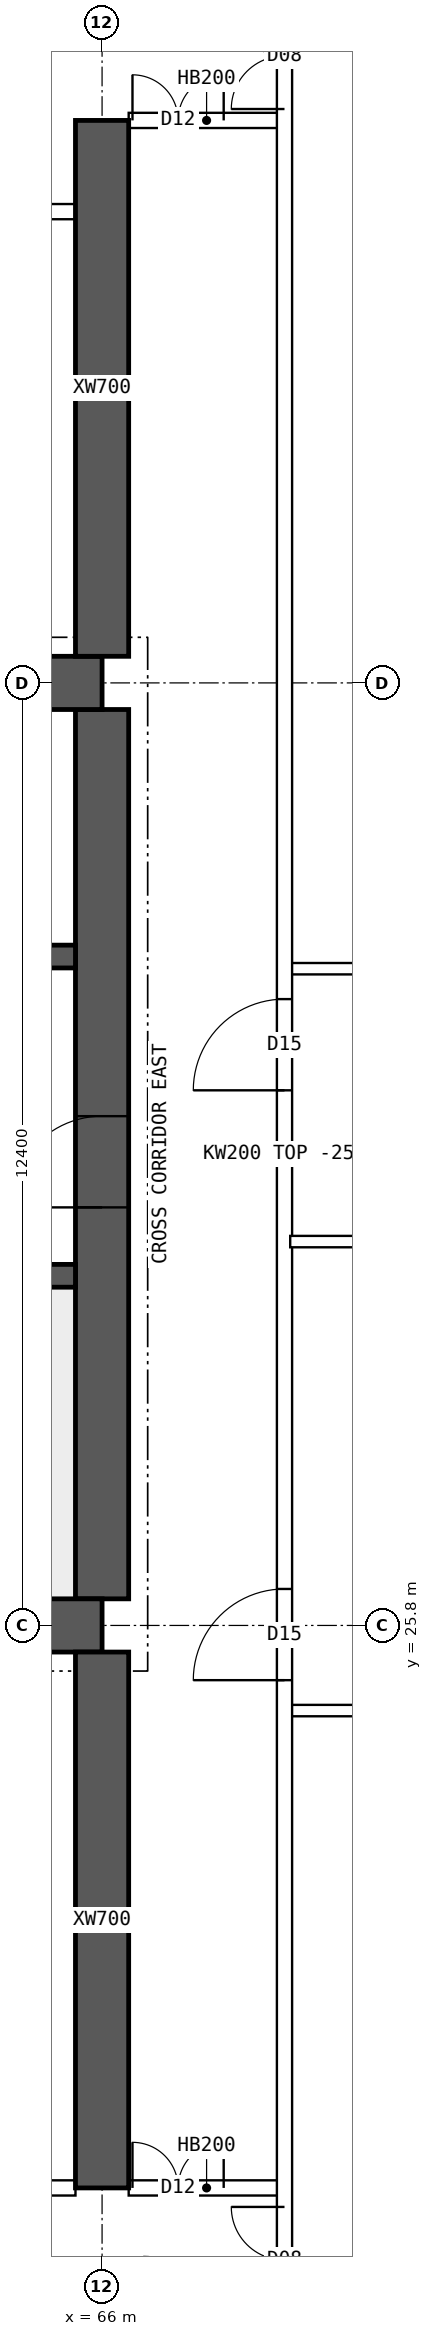
"""IFC4 building model, lengths in metres.
Left out: names, types, materials, properties, quantities, classifications, styles, units other than length and angle.
Written with IfcOpenShell. Run it as: python <this file> out.ifc"""

import sys

from ifc_helpers import new_model, si_unit, direction, frame, frame_2d, origin, place, context, subcontext, project, spatial, polyline, rectangle, outline, extrude, element, fill, save


model = new_model("IFC4")
c1 = context("Model", 3, precision=1e-05, world=origin(), true_north=direction((0.0, 1.0)))
c2 = subcontext(c1, "Body", "Model", "MODEL_VIEW")
j1 = project(units=[si_unit("LENGTHUNIT", "METRE"), si_unit("PLANEANGLEUNIT", "RADIAN")], contexts=[c1])
p1 = place(None, origin())
s1 = spatial("IfcSite", under=j1, at=p1, CompositionType="ELEMENT")
p2 = place(p1, origin())
s2 = spatial("IfcBuilding", under=s1, at=p2, CompositionType="ELEMENT")
p3 = place(p2, frame((0.0, 0.0, 224.05)))
s3 = spatial("IfcBuildingStorey", under=s2, at=p3, CompositionType="ELEMENT", Elevation=224.05)
for number, where, z_axis, x_axis in (
    (1, (18.0, 25.8, 0.0), (0.0, 0.0, 1.0), (1.0, 0.0, 0.0)),
    (2, (18.0, 38.2, 0.0), (0.0, 0.0, 1.0), (1.0, 0.0, 0.0)),
):
    element("IfcWall", number, at=place(p3, frame(where, z_axis=z_axis, x_axis=x_axis)), inside=s3, PredefinedType="SHEAR", context=c2, shape_type="SweptSolid", body=[
        extrude(rectangle(XDim=48.0, YDim=0.7, at=frame_2d((24.0, 0.0))), origin(), (0.0, 0.0, 1.0), 3.75),
    ])
p4 = place(p3, frame((66.0, 26.15, 0.0), z_axis=(0.0, 0.0, 1.0), x_axis=(0.0, 1.0, 0.0)))
e3 = element("IfcWall", 3, at=p4, inside=s3, PredefinedType="SHEAR", context=c2, shape_type="SweptSolid", body=[
    extrude(rectangle(XDim=11.7, YDim=0.7, at=frame_2d((5.85, 0.0))), origin(), (0.0, 0.0, 1.0), 3.75),
])
p5 = place(p4, frame((5.15, 0.0, 0.0)))
e4 = element("IfcOpeningElement", 4, at=p5, cuts=e3, PredefinedType="OPENING", context=c2, shape_type="SweptSolid", body=[
    extrude(rectangle(XDim=1.2, YDim=2.1, at=frame_2d((0.6, 1.05))), frame((0.0, 0.36, 0.0), z_axis=(0.0, -1.0, 0.0), x_axis=(1.0, 0.0, 0.0)), (0.0, 0.0, 1.0), 0.72),
])
p6 = place(p3, frame((18.35, 30.4, 0.0), z_axis=(0.0, 0.0, 1.0), x_axis=(1.0, 0.0, 0.0)))
e5 = element("IfcWall", 5, at=p6, inside=s3, PredefinedType="SHEAR", context=c2, shape_type="SweptSolid", body=[
    extrude(rectangle(XDim=47.3, YDim=0.3, at=frame_2d((23.65, 0.0))), origin(), (0.0, 0.0, 1.0), 3.75),
])
p7 = place(p6, frame((0.4, 0.0, 0.0)))
e6 = element("IfcOpeningElement", 6, at=p7, cuts=e5, PredefinedType="OPENING", context=c2, shape_type="SweptSolid", body=[
    extrude(rectangle(XDim=1.0, YDim=2.1, at=frame_2d((0.5, 1.05))), frame((0.0, 0.16, 0.0), z_axis=(0.0, -1.0, 0.0), x_axis=(1.0, 0.0, 0.0)), (0.0, 0.0, 1.0), 0.32),
])
p8 = place(p6, frame((45.9, 0.0, 0.0)))
e7 = element("IfcOpeningElement", 7, at=p8, cuts=e5, PredefinedType="OPENING", context=c2, shape_type="SweptSolid", body=[
    extrude(rectangle(XDim=1.0, YDim=2.1, at=frame_2d((0.5, 1.05))), frame((0.0, 0.16, 0.0), z_axis=(0.0, -1.0, 0.0), x_axis=(1.0, 0.0, 0.0)), (0.0, 0.0, 1.0), 0.32),
])
p9 = place(p6, frame((8.4, 0.0, 0.0)))
e8 = element("IfcOpeningElement", 8, at=p9, cuts=e5, PredefinedType="OPENING", context=c2, shape_type="SweptSolid", body=[
    extrude(rectangle(XDim=1.1, YDim=2.1, at=frame_2d((0.55, 1.05))), frame((0.0, 0.16, 0.0), z_axis=(0.0, -1.0, 0.0), x_axis=(1.0, 0.0, 0.0)), (0.0, 0.0, 1.0), 0.32),
])
p10 = place(p6, frame((11.0, 0.0, 0.0)))
e9 = element("IfcOpeningElement", 9, at=p10, cuts=e5, PredefinedType="OPENING", context=c2, shape_type="SweptSolid", body=[
    extrude(rectangle(XDim=1.1, YDim=2.1, at=frame_2d((0.55, 1.05))), frame((0.0, 0.16, 0.0), z_axis=(0.0, -1.0, 0.0), x_axis=(1.0, 0.0, 0.0)), (0.0, 0.0, 1.0), 0.32),
])
p11 = place(p6, frame((13.6, 0.0, 0.0)))
e10 = element("IfcOpeningElement", 10, at=p11, cuts=e5, PredefinedType="OPENING", context=c2, shape_type="SweptSolid", body=[
    extrude(rectangle(XDim=1.1, YDim=2.1, at=frame_2d((0.55, 1.05))), frame((0.0, 0.16, 0.0), z_axis=(0.0, -1.0, 0.0), x_axis=(1.0, 0.0, 0.0)), (0.0, 0.0, 1.0), 0.32),
])
p12 = place(p6, frame((16.2, 0.0, 0.0)))
e11 = element("IfcOpeningElement", 11, at=p12, cuts=e5, PredefinedType="OPENING", context=c2, shape_type="SweptSolid", body=[
    extrude(rectangle(XDim=1.1, YDim=2.1, at=frame_2d((0.55, 1.05))), frame((0.0, 0.16, 0.0), z_axis=(0.0, -1.0, 0.0), x_axis=(1.0, 0.0, 0.0)), (0.0, 0.0, 1.0), 0.32),
])
p13 = place(p6, frame((18.975, 0.0, 0.0)))
e12 = element("IfcOpeningElement", 12, at=p13, cuts=e5, PredefinedType="OPENING", context=c2, shape_type="SweptSolid", body=[
    extrude(rectangle(XDim=0.9, YDim=2.1, at=frame_2d((0.45, 1.05))), frame((0.0, 0.16, 0.0), z_axis=(0.0, -1.0, 0.0), x_axis=(1.0, 0.0, 0.0)), (0.0, 0.0, 1.0), 0.32),
])
p14 = place(p6, frame((24.475, 0.0, 0.0)))
e13 = element("IfcOpeningElement", 13, at=p14, cuts=e5, PredefinedType="OPENING", context=c2, shape_type="SweptSolid", body=[
    extrude(rectangle(XDim=0.9, YDim=2.1, at=frame_2d((0.45, 1.05))), frame((0.0, 0.16, 0.0), z_axis=(0.0, -1.0, 0.0), x_axis=(1.0, 0.0, 0.0)), (0.0, 0.0, 1.0), 0.32),
])
p15 = place(p6, frame((30.267, 0.0, 0.0)))
e14 = element("IfcOpeningElement", 14, at=p15, cuts=e5, PredefinedType="OPENING", context=c2, shape_type="SweptSolid", body=[
    extrude(rectangle(XDim=1.1, YDim=2.1, at=frame_2d((0.55, 1.05))), frame((0.0, 0.16, 0.0), z_axis=(0.0, -1.0, 0.0), x_axis=(1.0, 0.0, 0.0)), (0.0, 0.0, 1.0), 0.32),
])
p16 = place(p6, frame((33.8, 0.0, 0.0)))
e15 = element("IfcOpeningElement", 15, at=p16, cuts=e5, PredefinedType="OPENING", context=c2, shape_type="SweptSolid", body=[
    extrude(rectangle(XDim=1.1, YDim=2.1, at=frame_2d((0.55, 1.05))), frame((0.0, 0.16, 0.0), z_axis=(0.0, -1.0, 0.0), x_axis=(1.0, 0.0, 0.0)), (0.0, 0.0, 1.0), 0.32),
])
p17 = place(p6, frame((37.333, 0.0, 0.0)))
e16 = element("IfcOpeningElement", 16, at=p17, cuts=e5, PredefinedType="OPENING", context=c2, shape_type="SweptSolid", body=[
    extrude(rectangle(XDim=1.1, YDim=2.1, at=frame_2d((0.55, 1.05))), frame((0.0, 0.16, 0.0), z_axis=(0.0, -1.0, 0.0), x_axis=(1.0, 0.0, 0.0)), (0.0, 0.0, 1.0), 0.32),
])
p18 = place(p3, frame((18.35, 34.6, 0.0), z_axis=(0.0, 0.0, 1.0), x_axis=(1.0, 0.0, 0.0)))
e17 = element("IfcWall", 17, at=p18, inside=s3, PredefinedType="SHEAR", context=c2, shape_type="SweptSolid", body=[
    extrude(rectangle(XDim=47.3, YDim=0.3, at=frame_2d((23.65, 0.0))), origin(), (0.0, 0.0, 1.0), 3.75),
])
p19 = place(p18, frame((0.9, 0.0, 0.0)))
e18 = element("IfcOpeningElement", 18, at=p19, cuts=e17, PredefinedType="OPENING", context=c2, shape_type="SweptSolid", body=[
    extrude(rectangle(XDim=1.1, YDim=2.1, at=frame_2d((0.55, 1.05))), frame((0.0, 0.16, 0.0), z_axis=(0.0, -1.0, 0.0), x_axis=(1.0, 0.0, 0.0)), (0.0, 0.0, 1.0), 0.32),
])
p20 = place(p18, frame((45.3, 0.0, 0.0)))
e19 = element("IfcOpeningElement", 19, at=p20, cuts=e17, PredefinedType="OPENING", context=c2, shape_type="SweptSolid", body=[
    extrude(rectangle(XDim=1.1, YDim=2.1, at=frame_2d((0.55, 1.05))), frame((0.0, 0.16, 0.0), z_axis=(0.0, -1.0, 0.0), x_axis=(1.0, 0.0, 0.0)), (0.0, 0.0, 1.0), 0.32),
])
p21 = place(p18, frame((4.25, 0.0, 0.0)))
e20 = element("IfcOpeningElement", 20, at=p21, cuts=e17, PredefinedType="OPENING", context=c2, shape_type="SweptSolid", body=[
    extrude(rectangle(XDim=0.9, YDim=2.1, at=frame_2d((0.45, 1.05))), frame((0.0, 0.16, 0.0), z_axis=(0.0, -1.0, 0.0), x_axis=(1.0, 0.0, 0.0)), (0.0, 0.0, 1.0), 0.32),
])
p22 = place(p18, frame((42.15, 0.0, 0.0)))
e21 = element("IfcOpeningElement", 21, at=p22, cuts=e17, PredefinedType="OPENING", context=c2, shape_type="SweptSolid", body=[
    extrude(rectangle(XDim=0.9, YDim=2.1, at=frame_2d((0.45, 1.05))), frame((0.0, 0.16, 0.0), z_axis=(0.0, -1.0, 0.0), x_axis=(1.0, 0.0, 0.0)), (0.0, 0.0, 1.0), 0.32),
])
p23 = place(p18, frame((9.025, 0.0, 0.0)))
e22 = element("IfcOpeningElement", 22, at=p23, cuts=e17, PredefinedType="OPENING", context=c2, shape_type="SweptSolid", body=[
    extrude(rectangle(XDim=0.9, YDim=2.1, at=frame_2d((0.45, 1.05))), frame((0.0, 0.16, 0.0), z_axis=(0.0, -1.0, 0.0), x_axis=(1.0, 0.0, 0.0)), (0.0, 0.0, 1.0), 0.32),
])
p24 = place(p18, frame((12.999, 0.0, 0.0)))
e23 = element("IfcOpeningElement", 23, at=p24, cuts=e17, PredefinedType="OPENING", context=c2, shape_type="SweptSolid", body=[
    extrude(rectangle(XDim=0.9, YDim=2.1, at=frame_2d((0.45, 1.05))), frame((0.0, 0.16, 0.0), z_axis=(0.0, -1.0, 0.0), x_axis=(1.0, 0.0, 0.0)), (0.0, 0.0, 1.0), 0.32),
])
p25 = place(p18, frame((16.646, 0.0, 0.0)))
e24 = element("IfcOpeningElement", 24, at=p25, cuts=e17, PredefinedType="OPENING", context=c2, shape_type="SweptSolid", body=[
    extrude(rectangle(XDim=0.9, YDim=2.1, at=frame_2d((0.45, 1.05))), frame((0.0, 0.16, 0.0), z_axis=(0.0, -1.0, 0.0), x_axis=(1.0, 0.0, 0.0)), (0.0, 0.0, 1.0), 0.32),
])
p26 = place(p18, frame((20.405, 0.0, 0.0)))
e25 = element("IfcOpeningElement", 25, at=p26, cuts=e17, PredefinedType="OPENING", context=c2, shape_type="SweptSolid", body=[
    extrude(rectangle(XDim=0.9, YDim=2.1, at=frame_2d((0.45, 1.05))), frame((0.0, 0.16, 0.0), z_axis=(0.0, -1.0, 0.0), x_axis=(1.0, 0.0, 0.0)), (0.0, 0.0, 1.0), 0.32),
])
p27 = place(p18, frame((24.811, 0.0, 0.0)))
e26 = element("IfcOpeningElement", 26, at=p27, cuts=e17, PredefinedType="OPENING", context=c2, shape_type="SweptSolid", body=[
    extrude(rectangle(XDim=0.9, YDim=2.1, at=frame_2d((0.45, 1.05))), frame((0.0, 0.16, 0.0), z_axis=(0.0, -1.0, 0.0), x_axis=(1.0, 0.0, 0.0)), (0.0, 0.0, 1.0), 0.32),
])
p28 = place(p18, frame((27.608, 0.0, 0.0)))
e27 = element("IfcOpeningElement", 27, at=p28, cuts=e17, PredefinedType="OPENING", context=c2, shape_type="SweptSolid", body=[
    extrude(rectangle(XDim=0.9, YDim=2.1, at=frame_2d((0.45, 1.05))), frame((0.0, 0.16, 0.0), z_axis=(0.0, -1.0, 0.0), x_axis=(1.0, 0.0, 0.0)), (0.0, 0.0, 1.0), 0.32),
])
p29 = place(p18, frame((29.575, 0.0, 0.0)))
e28 = element("IfcOpeningElement", 28, at=p29, cuts=e17, PredefinedType="OPENING", context=c2, shape_type="SweptSolid", body=[
    extrude(rectangle(XDim=0.9, YDim=2.1, at=frame_2d((0.45, 1.05))), frame((0.0, 0.16, 0.0), z_axis=(0.0, -1.0, 0.0), x_axis=(1.0, 0.0, 0.0)), (0.0, 0.0, 1.0), 0.32),
])
p30 = place(p18, frame((32.007, 0.0, 0.0)))
e29 = element("IfcOpeningElement", 29, at=p30, cuts=e17, PredefinedType="OPENING", context=c2, shape_type="SweptSolid", body=[
    extrude(rectangle(XDim=0.9, YDim=2.1, at=frame_2d((0.45, 1.05))), frame((0.0, 0.16, 0.0), z_axis=(0.0, -1.0, 0.0), x_axis=(1.0, 0.0, 0.0)), (0.0, 0.0, 1.0), 0.32),
])
p31 = place(p18, frame((34.742, 0.0, 0.0)))
e30 = element("IfcOpeningElement", 30, at=p31, cuts=e17, PredefinedType="OPENING", context=c2, shape_type="SweptSolid", body=[
    extrude(rectangle(XDim=0.9, YDim=2.1, at=frame_2d((0.45, 1.05))), frame((0.0, 0.16, 0.0), z_axis=(0.0, -1.0, 0.0), x_axis=(1.0, 0.0, 0.0)), (0.0, 0.0, 1.0), 0.32),
])
p32 = place(p18, frame((37.781, 0.0, 0.0)))
e31 = element("IfcOpeningElement", 31, at=p32, cuts=e17, PredefinedType="OPENING", context=c2, shape_type="SweptSolid", body=[
    extrude(rectangle(XDim=0.9, YDim=2.1, at=frame_2d((0.45, 1.05))), frame((0.0, 0.16, 0.0), z_axis=(0.0, -1.0, 0.0), x_axis=(1.0, 0.0, 0.0)), (0.0, 0.0, 1.0), 0.32),
])
for number, where, z_axis, x_axis in (
    (32, (66.0, 18.4, 0.0), (0.0, 0.0, 1.0), (0.0, 1.0, 0.0)),
    (33, (66.0, 38.55, 0.0), (0.0, 0.0, 1.0), (0.0, 1.0, 0.0)),
):
    element("IfcWall", number, at=place(p3, frame(where, z_axis=z_axis, x_axis=x_axis)), inside=s3, PredefinedType="SHEAR", context=c2, shape_type="SweptSolid", body=[
        extrude(rectangle(XDim=7.05, YDim=0.7, at=frame_2d((3.525, 0.0))), origin(), (0.0, 0.0, 1.0), 3.75),
    ])
p33 = place(p3, frame((60.35, 18.4, 0.0), z_axis=(0.0, 0.0, 1.0), x_axis=(1.0, 0.0, 0.0)))
e34 = element("IfcWall", 34, at=p33, inside=s3, PredefinedType="SOLIDWALL", context=c2, shape_type="SweptSolid", body=[
    extrude(rectangle(XDim=5.3, YDim=0.2, at=frame_2d((2.65, 0.0))), origin(), (0.0, 0.0, 1.0), 3.5),
])
p34 = place(p33, frame((0.15, 0.0, 0.0)))
e35 = element("IfcOpeningElement", 35, at=p34, cuts=e34, PredefinedType="OPENING", context=c2, shape_type="SweptSolid", body=[
    extrude(rectangle(XDim=0.9, YDim=2.1, at=frame_2d((0.45, 1.05))), frame((0.0, 0.11, 0.0), z_axis=(0.0, -1.0, 0.0), x_axis=(1.0, 0.0, 0.0)), (0.0, 0.0, 1.0), 0.22),
])
p35 = place(p33, frame((2.15, 0.0, 0.0)))
e36 = element("IfcOpeningElement", 36, at=p35, cuts=e34, PredefinedType="OPENING", context=c2, shape_type="SweptSolid", body=[
    extrude(rectangle(XDim=0.9, YDim=2.1, at=frame_2d((0.45, 1.05))), frame((0.0, 0.11, 0.0), z_axis=(0.0, -1.0, 0.0), x_axis=(1.0, 0.0, 0.0)), (0.0, 0.0, 1.0), 0.22),
])
p36 = place(p3, frame((66.35, 18.4, 0.0), z_axis=(0.0, 0.0, 1.0), x_axis=(1.0, 0.0, 0.0)))
e37 = element("IfcWall", 37, at=p36, inside=s3, PredefinedType="SOLIDWALL", context=c2, shape_type="SweptSolid", body=[
    extrude(rectangle(XDim=2.05, YDim=0.2, at=frame_2d((1.025, 0.0))), origin(), (0.0, 0.0, 1.0), 3.5),
])
p37 = place(p36, frame((0.05, 0.0, 0.0)))
e38 = element("IfcOpeningElement", 38, at=p37, cuts=e37, PredefinedType="OPENING", context=c2, shape_type="SweptSolid", body=[
    extrude(rectangle(XDim=1.2, YDim=2.1, at=frame_2d((0.6, 1.05))), frame((0.0, 0.11, 0.0), z_axis=(0.0, -1.0, 0.0), x_axis=(1.0, 0.0, 0.0)), (0.0, 0.0, 1.0), 0.22),
])
p38 = place(p3, frame((66.35, 45.6, 0.0), z_axis=(0.0, 0.0, 1.0), x_axis=(1.0, 0.0, 0.0)))
e39 = element("IfcWall", 39, at=p38, inside=s3, PredefinedType="SOLIDWALL", context=c2, shape_type="SweptSolid", body=[
    extrude(rectangle(XDim=2.05, YDim=0.2, at=frame_2d((1.025, 0.0))), origin(), (0.0, 0.0, 1.0), 3.5),
])
p39 = place(p38, frame((0.05, 0.0, 0.0)))
e40 = element("IfcOpeningElement", 40, at=p39, cuts=e39, PredefinedType="OPENING", context=c2, shape_type="SweptSolid", body=[
    extrude(rectangle(XDim=1.2, YDim=2.1, at=frame_2d((0.6, 1.05))), frame((0.0, 0.11, 0.0), z_axis=(0.0, -1.0, 0.0), x_axis=(1.0, 0.0, 0.0)), (0.0, 0.0, 1.0), 0.22),
])
p40 = place(p3, frame((60.35, 44.4, 0.0), z_axis=(0.0, 0.0, 1.0), x_axis=(1.0, 0.0, 0.0)))
e41 = element("IfcWall", 41, at=p40, inside=s3, PredefinedType="SOLIDWALL", context=c2, shape_type="SweptSolid", body=[
    extrude(rectangle(XDim=5.3, YDim=0.2, at=frame_2d((2.65, 0.0))), origin(), (0.0, 0.0, 1.0), 3.5),
])
p41 = place(p40, frame((0.525, 0.0, 0.0)))
e42 = element("IfcOpeningElement", 42, at=p41, cuts=e41, PredefinedType="OPENING", context=c2, shape_type="SweptSolid", body=[
    extrude(rectangle(XDim=1.0, YDim=2.1, at=frame_2d((0.5, 1.05))), frame((0.0, 0.11, 0.0), z_axis=(0.0, -1.0, 0.0), x_axis=(1.0, 0.0, 0.0)), (0.0, 0.0, 1.0), 0.22),
])
p42 = place(p3, frame((68.475, 30.85, 0.0), z_axis=(0.0, 0.0, 1.0), x_axis=(1.0, 0.0, 0.0)))
e43 = element("IfcWall", 43, at=p42, inside=s3, PredefinedType="PARTITIONING", context=c2, shape_type="SweptSolid", body=[
    extrude(outline(polyline([(0.0, 0.0), (6.82, 0.0), (6.82, 3.5), (3.827, 3.5), (3.825, 3.05), (3.227, 3.05), (3.225, 3.5), (0.0, 3.5), (0.0, 0.0)])), frame((0.0, 0.075, 0.0), z_axis=(0.0, -1.0, 0.0), x_axis=(1.0, 0.0, 0.0)), (0.0, 0.0, 1.0), 0.15),
])
p43 = place(p3, frame((68.4, 11.646, 0.0), z_axis=(0.0, 0.0, 1.0), x_axis=(0.0, 1.0, 0.0)))
e44 = element("IfcWall", 44, at=p43, inside=s3, PredefinedType="SOLIDWALL", context=c2, shape_type="SweptSolid", body=[
    extrude(rectangle(XDim=40.708, YDim=0.2, at=frame_2d((20.354, 0.0))), origin(), (0.0, 0.0, 1.0), 3.5),
])
p44 = place(p43, frame((13.434, 0.0, 0.0)))
e45 = element("IfcOpeningElement", 45, at=p44, cuts=e44, PredefinedType="OPENING", context=c2, shape_type="SweptSolid", body=[
    extrude(rectangle(XDim=1.2, YDim=2.1, at=frame_2d((0.6, 1.05))), frame((0.0, 0.11, 0.0), z_axis=(0.0, -1.0, 0.0), x_axis=(1.0, 0.0, 0.0)), (0.0, 0.0, 1.0), 0.22),
])
p45 = place(p43, frame((21.194, 0.0, 0.0)))
e46 = element("IfcOpeningElement", 46, at=p45, cuts=e44, PredefinedType="OPENING", context=c2, shape_type="SweptSolid", body=[
    extrude(rectangle(XDim=1.2, YDim=2.1, at=frame_2d((0.6, 1.05))), frame((0.0, 0.11, 0.0), z_axis=(0.0, -1.0, 0.0), x_axis=(1.0, 0.0, 0.0)), (0.0, 0.0, 1.0), 0.22),
])
p46 = place(p43, frame((5.104, 0.0, 0.0)))
e47 = element("IfcOpeningElement", 47, at=p46, cuts=e44, PredefinedType="OPENING", context=c2, shape_type="SweptSolid", body=[
    extrude(rectangle(XDim=1.4, YDim=2.1, at=frame_2d((0.7, 1.05))), frame((0.0, 0.11, 0.0), z_axis=(0.0, -1.0, 0.0), x_axis=(1.0, 0.0, 0.0)), (0.0, 0.0, 1.0), 0.22),
])
p47 = place(p43, frame((34.104, 0.0, 0.0)))
e48 = element("IfcOpeningElement", 48, at=p47, cuts=e44, PredefinedType="OPENING", context=c2, shape_type="SweptSolid", body=[
    extrude(rectangle(XDim=1.4, YDim=2.1, at=frame_2d((0.7, 1.05))), frame((0.0, 0.11, 0.0), z_axis=(0.0, -1.0, 0.0), x_axis=(1.0, 0.0, 0.0)), (0.0, 0.0, 1.0), 0.22),
])
p48 = place(p3, frame((68.475, 24.68, 0.0), z_axis=(0.0, 0.0, 1.0), x_axis=(1.0, 0.0, 0.0)))
e49 = element("IfcWall", 49, at=p48, inside=s3, PredefinedType="PARTITIONING", context=c2, shape_type="SweptSolid", body=[
    extrude(rectangle(XDim=6.82, YDim=0.15, at=frame_2d((3.41, 0.0))), origin(), (0.0, 0.0, 1.0), 3.5),
])
p49 = place(p3, frame((68.475, 34.44, 0.0), z_axis=(0.0, 0.0, 1.0), x_axis=(1.0, 0.0, 0.0)))
e50 = element("IfcWall", 50, at=p49, inside=s3, PredefinedType="PARTITIONING", context=c2, shape_type="SweptSolid", body=[
    extrude(outline(polyline([(0.0, 0.0), (6.82, 0.0), (6.82, 3.5), (3.827, 3.5), (3.825, 3.05), (3.227, 3.05), (3.225, 3.5), (0.0, 3.5), (0.0, 0.0)])), frame((0.0, 0.075, 0.0), z_axis=(0.0, -1.0, 0.0), x_axis=(1.0, 0.0, 0.0)), (0.0, 0.0, 1.0), 0.15),
])
p50 = place(p5, origin())
e51 = element("IfcDoor", 51, at=p50, inside=s3, OperationType="SINGLE_SWING_LEFT", PredefinedType="DOOR", context=c2, shape_type="SweptSolid", body=[
    extrude(rectangle(XDim=1.2, YDim=2.1, at=frame_2d((0.6, 1.05))), frame((0.0, 0.025, 0.0), z_axis=(0.0, -1.0, 0.0), x_axis=(1.0, 0.0, 0.0)), (0.0, 0.0, 1.0), 0.05),
])
fill(e4, e51)
p51 = place(p37, origin())
e52 = element("IfcDoor", 52, at=p51, inside=s3, OperationType="DOUBLE_DOOR_SINGLE_SWING", PredefinedType="DOOR", context=c2, shape_type="SweptSolid", body=[
    extrude(rectangle(XDim=1.2, YDim=2.1, at=frame_2d((0.6, 1.05))), frame((0.0, 0.025, 0.0), z_axis=(0.0, -1.0, 0.0), x_axis=(1.0, 0.0, 0.0)), (0.0, 0.0, 1.0), 0.05),
])
fill(e38, e52)
p52 = place(p39, origin())
e53 = element("IfcDoor", 53, at=p52, inside=s3, OperationType="DOUBLE_DOOR_SINGLE_SWING", PredefinedType="DOOR", context=c2, shape_type="SweptSolid", body=[
    extrude(rectangle(XDim=1.2, YDim=2.1, at=frame_2d((0.6, 1.05))), frame((0.0, 0.025, 0.0), z_axis=(0.0, -1.0, 0.0), x_axis=(1.0, 0.0, 0.0)), (0.0, 0.0, 1.0), 0.05),
])
fill(e40, e53)
p53 = place(p44, origin())
e54 = element("IfcDoor", 54, at=p53, inside=s3, OperationType="SINGLE_SWING_LEFT", PredefinedType="DOOR", context=c2, shape_type="SweptSolid", body=[
    extrude(rectangle(XDim=1.2, YDim=2.1, at=frame_2d((0.6, 1.05))), frame((0.0, 0.025, 0.0), z_axis=(0.0, -1.0, 0.0), x_axis=(1.0, 0.0, 0.0)), (0.0, 0.0, 1.0), 0.05),
])
fill(e45, e54)
p54 = place(p45, origin())
e55 = element("IfcDoor", 55, at=p54, inside=s3, OperationType="SINGLE_SWING_LEFT", PredefinedType="DOOR", context=c2, shape_type="SweptSolid", body=[
    extrude(rectangle(XDim=1.2, YDim=2.1, at=frame_2d((0.6, 1.05))), frame((0.0, 0.025, 0.0), z_axis=(0.0, -1.0, 0.0), x_axis=(1.0, 0.0, 0.0)), (0.0, 0.0, 1.0), 0.05),
])
fill(e46, e55)
p55 = place(p46, origin())
e56 = element("IfcDoor", 56, at=p55, inside=s3, OperationType="DOUBLE_DOOR_SINGLE_SWING", PredefinedType="DOOR", context=c2, shape_type="SweptSolid", body=[
    extrude(rectangle(XDim=1.4, YDim=2.1, at=frame_2d((0.7, 1.05))), frame((0.0, 0.025, 0.0), z_axis=(0.0, -1.0, 0.0), x_axis=(1.0, 0.0, 0.0)), (0.0, 0.0, 1.0), 0.05),
])
fill(e47, e56)
p56 = place(p47, origin())
e57 = element("IfcDoor", 57, at=p56, inside=s3, OperationType="DOUBLE_DOOR_SINGLE_SWING", PredefinedType="DOOR", context=c2, shape_type="SweptSolid", body=[
    extrude(rectangle(XDim=1.4, YDim=2.1, at=frame_2d((0.7, 1.05))), frame((0.0, 0.025, 0.0), z_axis=(0.0, -1.0, 0.0), x_axis=(1.0, 0.0, 0.0)), (0.0, 0.0, 1.0), 0.05),
])
fill(e48, e57)
save(model, sys.argv[1])
